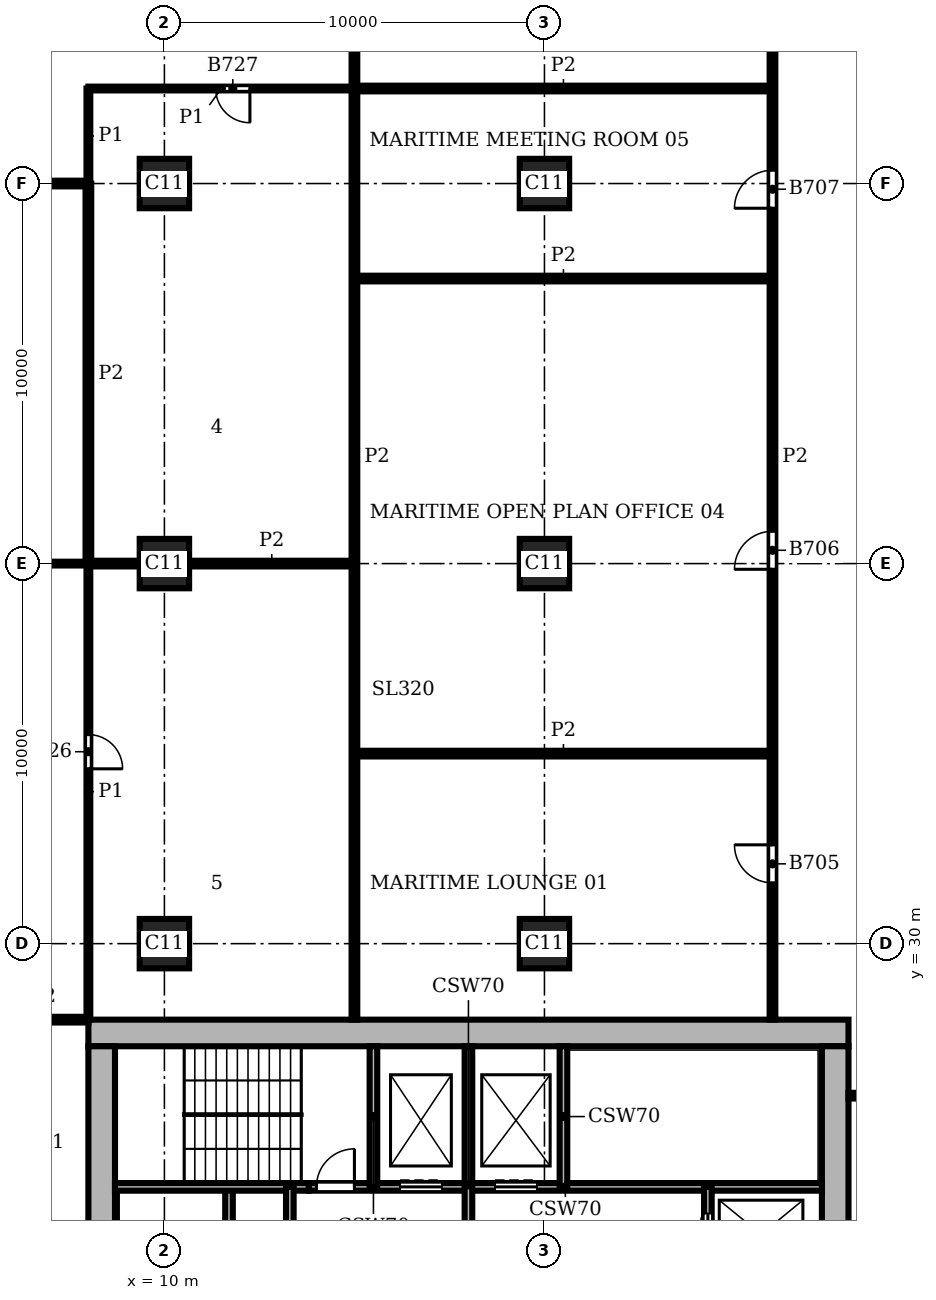
"""IFC4 building model, lengths in metres.
Left out: names, types, materials, properties, quantities, classifications, styles, units other than length and angle.
Written with IfcOpenShell. Run it as: python <this file> out.ifc"""

import sys

from ifc_helpers import new_model, si_unit, direction, frame, frame_2d, origin, origin_2d, place, context, subcontext, project, spatial, rectangle, extrude, element, fill, save


model = new_model("IFC4")
c1 = context("Model", 3, precision=1e-05, world=origin(), true_north=direction((0.0, 1.0)))
c2 = subcontext(c1, "Body", "Model", "MODEL_VIEW")
j1 = project(units=[si_unit("LENGTHUNIT", "METRE"), si_unit("PLANEANGLEUNIT", "RADIAN")], contexts=[c1])
p1 = place(None, origin())
s1 = spatial("IfcSite", under=j1, at=p1, CompositionType="ELEMENT")
p2 = place(p1, origin())
s2 = spatial("IfcBuilding", under=s1, at=p2, CompositionType="ELEMENT")
p3 = place(p2, frame((0.0, 0.0, 205.8)))
s3 = spatial("IfcBuildingStorey", under=s2, at=p3, CompositionType="ELEMENT", Elevation=205.8)
for number, where, z_axis, x_axis in (
    (1, (10.0, 30.0, 0.0), (0.0, 0.0, 1.0), (1.0, 0.0, 0.0)),
    (2, (10.0, 40.0, 0.0), (0.0, 0.0, 1.0), (1.0, 0.0, 0.0)),
    (3, (10.0, 50.0, 0.0), (0.0, 0.0, 1.0), (1.0, 0.0, 0.0)),
    (4, (20.0, 30.0, 0.0), (0.0, 0.0, 1.0), (1.0, 0.0, 0.0)),
    (5, (20.0, 40.0, 0.0), (0.0, 0.0, 1.0), (1.0, 0.0, 0.0)),
    (6, (20.0, 50.0, 0.0), (0.0, 0.0, 1.0), (1.0, 0.0, 0.0)),
):
    element("IfcColumn", number, at=place(p3, frame(where, z_axis=z_axis, x_axis=x_axis)), inside=s3, PredefinedType="COLUMN", context=c2, shape_type="SweptSolid", body=[
        extrude(rectangle(XDim=1.3, YDim=1.3, at=origin_2d()), origin(), (0.0, 0.0, 1.0), 3.9),
    ])
p4 = place(p3, frame((27.65, 8.7, 0.0), z_axis=(0.0, 0.0, 1.0), x_axis=(0.0, 1.0, 0.0)))
e7 = element("IfcWall", 7, at=p4, inside=s3, PredefinedType="SHEAR", context=c2, shape_type="SweptSolid", body=[
    extrude(rectangle(XDim=18.6, YDim=0.7, at=frame_2d((9.3, 0.0))), origin(), (0.0, 0.0, 1.0), 3.9),
])
p5 = place(p4, frame((4.75, 0.0, 0.0)))
e8 = element("IfcOpeningElement", 8, at=p5, cuts=e7, PredefinedType="OPENING", context=c2, shape_type="SweptSolid", body=[
    extrude(rectangle(XDim=1.6, YDim=2.1, at=frame_2d((0.8, 1.05))), frame((0.0, 0.36, 0.0), z_axis=(0.0, -1.0, 0.0), x_axis=(1.0, 0.0, 0.0)), (0.0, 0.0, 1.0), 0.72),
])
p6 = place(p3, frame((28.0, 27.65, 0.0), z_axis=(0.0, 0.0, 1.0), x_axis=(-1.0, 0.0, 0.0)))
e9 = element("IfcWall", 9, at=p6, inside=s3, PredefinedType="SHEAR", context=c2, shape_type="SweptSolid", body=[
    extrude(rectangle(XDim=20.0, YDim=0.7, at=frame_2d((10.0, 0.0))), origin(), (0.0, 0.0, 1.0), 3.9),
])
p7 = place(p3, frame((8.35, 27.3, 0.0), z_axis=(0.0, 0.0, 1.0), x_axis=(0.0, -1.0, 0.0)))
e10 = element("IfcWall", 10, at=p7, inside=s3, PredefinedType="SHEAR", context=c2, shape_type="SweptSolid", body=[
    extrude(rectangle(XDim=18.6, YDim=0.7, at=frame_2d((9.3, 0.0))), origin(), (0.0, 0.0, 1.0), 3.9),
])
p8 = place(p3, frame((8.7, 23.6, 0.0), z_axis=(0.0, 0.0, 1.0), x_axis=(1.0, 0.0, 0.0)))
e11 = element("IfcWall", 11, at=p8, inside=s3, PredefinedType="SHEAR", context=c2, shape_type="SweptSolid", body=[
    extrude(rectangle(XDim=5.1, YDim=0.2, at=frame_2d((2.55, 0.0))), origin(), (0.0, 0.0, 1.0), 3.58),
])
p9 = place(p3, frame((13.8, 23.6, 0.0), z_axis=(0.0, 0.0, 1.0), x_axis=(1.0, 0.0, 0.0)))
e12 = element("IfcWall", 12, at=p9, inside=s3, PredefinedType="SHEAR", context=c2, shape_type="SweptSolid", body=[
    extrude(rectangle(XDim=13.5, YDim=0.2, at=frame_2d((6.75, 0.0))), origin(), (0.0, 0.0, 1.0), 3.58),
])
p10 = place(p9, frame((2.4, 0.0, 0.0)))
e13 = element("IfcOpeningElement", 13, at=p10, cuts=e12, PredefinedType="OPENING", context=c2, shape_type="SweptSolid", body=[
    extrude(rectangle(XDim=1.1, YDim=2.1, at=frame_2d((0.55, 1.05))), frame((0.0, 0.11, 0.0), z_axis=(0.0, -1.0, 0.0), x_axis=(1.0, 0.0, 0.0)), (0.0, 0.0, 1.0), 0.22),
])
p11 = place(p9, frame((4.9, 0.0, 0.0)))
e14 = element("IfcOpeningElement", 14, at=p11, cuts=e12, PredefinedType="OPENING", context=c2, shape_type="SweptSolid", body=[
    extrude(rectangle(XDim=1.1, YDim=2.1, at=frame_2d((0.55, 1.05))), frame((0.0, 0.11, 0.0), z_axis=(0.0, -1.0, 0.0), x_axis=(1.0, 0.0, 0.0)), (0.0, 0.0, 1.0), 0.22),
])
p12 = place(p9, frame((0.2, 0.0, 0.0)))
e15 = element("IfcOpeningElement", 15, at=p12, cuts=e12, PredefinedType="OPENING", context=c2, shape_type="SweptSolid", body=[
    extrude(rectangle(XDim=1.0, YDim=2.1, at=frame_2d((0.5, 1.05))), frame((0.0, 0.11, 0.0), z_axis=(0.0, -1.0, 0.0), x_axis=(1.0, 0.0, 0.0)), (0.0, 0.0, 1.0), 0.22),
])
p13 = place(p3, frame((11.7, 12.4, 0.0), z_axis=(0.0, 0.0, 1.0), x_axis=(0.0, 1.0, 0.0)))
e16 = element("IfcWall", 16, at=p13, inside=s3, PredefinedType="SHEAR", context=c2, shape_type="SweptSolid", body=[
    extrude(rectangle(XDim=11.2, YDim=0.2, at=frame_2d((5.6, 0.0))), origin(), (0.0, 0.0, 1.0), 3.58),
])
p14 = place(p13, frame((0.7, 0.0, 0.0)))
e17 = element("IfcOpeningElement", 17, at=p14, cuts=e16, PredefinedType="OPENING", context=c2, shape_type="SweptSolid", body=[
    extrude(rectangle(XDim=1.1, YDim=2.1, at=frame_2d((0.55, 1.05))), frame((0.0, 0.11, 0.0), z_axis=(0.0, -1.0, 0.0), x_axis=(1.0, 0.0, 0.0)), (0.0, 0.0, 1.0), 0.22),
])
p15 = place(p13, frame((3.2, 0.0, 0.0)))
e18 = element("IfcOpeningElement", 18, at=p15, cuts=e16, PredefinedType="OPENING", context=c2, shape_type="SweptSolid", body=[
    extrude(rectangle(XDim=1.1, YDim=2.1, at=frame_2d((0.55, 1.05))), frame((0.0, 0.11, 0.0), z_axis=(0.0, -1.0, 0.0), x_axis=(1.0, 0.0, 0.0)), (0.0, 0.0, 1.0), 0.22),
])
p16 = place(p13, frame((5.7, 0.0, 0.0)))
e19 = element("IfcOpeningElement", 19, at=p16, cuts=e16, PredefinedType="OPENING", context=c2, shape_type="SweptSolid", body=[
    extrude(rectangle(XDim=1.1, YDim=2.1, at=frame_2d((0.55, 1.05))), frame((0.0, 0.11, 0.0), z_axis=(0.0, -1.0, 0.0), x_axis=(1.0, 0.0, 0.0)), (0.0, 0.0, 1.0), 0.22),
])
p17 = place(p13, frame((8.2, 0.0, 0.0)))
e20 = element("IfcOpeningElement", 20, at=p17, cuts=e16, PredefinedType="OPENING", context=c2, shape_type="SweptSolid", body=[
    extrude(rectangle(XDim=1.1, YDim=2.1, at=frame_2d((0.55, 1.05))), frame((0.0, 0.11, 0.0), z_axis=(0.0, -1.0, 0.0), x_axis=(1.0, 0.0, 0.0)), (0.0, 0.0, 1.0), 0.22),
])
p18 = place(p3, frame((13.3, 20.0, 0.0), z_axis=(0.0, 0.0, 1.0), x_axis=(0.0, 1.0, 0.0)))
e21 = element("IfcWall", 21, at=p18, inside=s3, PredefinedType="SHEAR", context=c2, shape_type="SweptSolid", body=[
    extrude(rectangle(XDim=3.6, YDim=0.2, at=frame_2d((1.8, 0.0))), origin(), (0.0, 0.0, 1.0), 3.58),
])
p19 = place(p3, frame((15.5, 23.6, 0.0), z_axis=(0.0, 0.0, 1.0), x_axis=(0.0, 1.0, 0.0)))
e22 = element("IfcWall", 22, at=p19, inside=s3, PredefinedType="SHEAR", context=c2, shape_type="SweptSolid", body=[
    extrude(rectangle(XDim=3.7, YDim=0.2, at=frame_2d((1.85, 0.0))), origin(), (0.0, 0.0, 1.0), 3.58),
])
p20 = place(p3, frame((18.0, 20.0, 0.0), z_axis=(0.0, 0.0, 1.0), x_axis=(0.0, 1.0, 0.0)))
e23 = element("IfcWall", 23, at=p20, inside=s3, PredefinedType="SHEAR", context=c2, shape_type="SweptSolid", body=[
    extrude(rectangle(XDim=7.3, YDim=0.2, at=frame_2d((3.65, 0.0))), origin(), (0.0, 0.0, 1.0), 3.58),
])
p21 = place(p20, frame((1.2, 0.0, 0.0)))
e24 = element("IfcOpeningElement", 24, at=p21, cuts=e23, PredefinedType="OPENING", context=c2, shape_type="SweptSolid", body=[
    extrude(rectangle(XDim=1.2, YDim=2.1, at=frame_2d((0.6, 1.05))), frame((0.0, 0.11, 0.0), z_axis=(0.0, -1.0, 0.0), x_axis=(1.0, 0.0, 0.0)), (0.0, 0.0, 1.0), 0.22),
])
p22 = place(p3, frame((20.5, 23.6, 0.0), z_axis=(0.0, 0.0, 1.0), x_axis=(0.0, 1.0, 0.0)))
e25 = element("IfcWall", 25, at=p22, inside=s3, PredefinedType="SHEAR", context=c2, shape_type="SweptSolid", body=[
    extrude(rectangle(XDim=3.7, YDim=0.2, at=frame_2d((1.85, 0.0))), origin(), (0.0, 0.0, 1.0), 3.58),
])
p23 = place(p3, frame((24.3, 16.1, 0.0), z_axis=(0.0, 0.0, 1.0), x_axis=(0.0, 1.0, 0.0)))
e26 = element("IfcWall", 26, at=p23, inside=s3, PredefinedType="SHEAR", context=c2, shape_type="SweptSolid", body=[
    extrude(rectangle(XDim=7.5, YDim=0.2, at=frame_2d((3.75, 0.0))), origin(), (0.0, 0.0, 1.0), 3.58),
])
p24 = place(p23, frame((5.7, 0.0, 0.0)))
e27 = element("IfcOpeningElement", 27, at=p24, cuts=e26, PredefinedType="OPENING", context=c2, shape_type="SweptSolid", body=[
    extrude(rectangle(XDim=1.1, YDim=2.1, at=frame_2d((0.55, 1.05))), frame((0.0, 0.11, 0.0), z_axis=(0.0, -1.0, 0.0), x_axis=(1.0, 0.0, 0.0)), (0.0, 0.0, 1.0), 0.22),
])
p25 = place(p3, frame((8.0, 28.0, 0.0), z_axis=(0.0, 0.0, 1.0), x_axis=(0.0, 1.0, 0.0)))
e28 = element("IfcWall", 28, at=p25, inside=s3, PredefinedType="PARTITIONING", context=c2, shape_type="SweptSolid", body=[
    extrude(rectangle(XDim=12.0, YDim=0.1, at=frame_2d((6.0, 0.0))), origin(), (0.0, 0.0, 1.0), 3.58),
])
p26 = place(p25, frame((6.6, 0.0, 0.0)))
e29 = element("IfcOpeningElement", 29, at=p26, cuts=e28, PredefinedType="OPENING", context=c2, shape_type="SweptSolid", body=[
    extrude(rectangle(XDim=0.9, YDim=2.1, at=frame_2d((0.45, 1.05))), frame((0.0, 0.06, 0.0), z_axis=(0.0, -1.0, 0.0), x_axis=(1.0, 0.0, 0.0)), (0.0, 0.0, 1.0), 0.12),
])
p27 = place(p3, frame((8.0, 50.0, 0.0), z_axis=(0.0, 0.0, 1.0), x_axis=(0.0, 1.0, 0.0)))
e30 = element("IfcWall", 30, at=p27, inside=s3, PredefinedType="PARTITIONING", context=c2, shape_type="SweptSolid", body=[
    extrude(rectangle(XDim=2.5, YDim=0.1, at=frame_2d((1.25, 0.0))), origin(), (0.0, 0.0, 1.0), 3.58),
])
p28 = place(p3, frame((0.45, 40.0, 0.0), z_axis=(0.0, 0.0, 1.0), x_axis=(1.0, 0.0, 0.0)))
e31 = element("IfcWall", 31, at=p28, inside=s3, PredefinedType="PARTITIONING", context=c2, shape_type="SweptSolid", body=[
    extrude(rectangle(XDim=7.55, YDim=0.1, at=frame_2d((3.775, 0.0))), origin(), (0.0, 0.0, 1.0), 3.58),
])
p29 = place(p28, frame((2.975, 0.0, 0.0)))
e32 = element("IfcOpeningElement", 32, at=p29, cuts=e31, PredefinedType="OPENING", context=c2, shape_type="SweptSolid", body=[
    extrude(rectangle(XDim=0.95, YDim=2.1, at=frame_2d((0.475, 1.05))), frame((0.0, 0.06, 0.0), z_axis=(0.0, -1.0, 0.0), x_axis=(1.0, 0.0, 0.0)), (0.0, 0.0, 1.0), 0.12),
])
p30 = place(p3, frame((8.0, 52.5, 0.0), z_axis=(0.0, 0.0, 1.0), x_axis=(1.0, 0.0, 0.0)))
e33 = element("IfcWall", 33, at=p30, inside=s3, PredefinedType="PARTITIONING", context=c2, shape_type="SweptSolid", body=[
    extrude(rectangle(XDim=7.0, YDim=0.1, at=frame_2d((3.5, 0.0))), origin(), (0.0, 0.0, 1.0), 3.58),
])
p31 = place(p30, frame((3.35, 0.0, 0.0)))
e34 = element("IfcOpeningElement", 34, at=p31, cuts=e33, PredefinedType="OPENING", context=c2, shape_type="SweptSolid", body=[
    extrude(rectangle(XDim=0.9, YDim=2.1, at=frame_2d((0.45, 1.05))), frame((0.0, 0.06, 0.0), z_axis=(0.0, -1.0, 0.0), x_axis=(1.0, 0.0, 0.0)), (0.0, 0.0, 1.0), 0.12),
])
p32 = place(p3, frame((8.0, 40.0, 0.0), z_axis=(0.0, 0.0, 1.0), x_axis=(0.0, 1.0, 0.0)))
e35 = element("IfcWall", 35, at=p32, inside=s3, PredefinedType="PARTITIONING", context=c2, shape_type="SweptSolid", body=[
    extrude(rectangle(XDim=10.0, YDim=0.15, at=frame_2d((5.0, 0.0))), origin(), (0.0, 0.0, 1.0), 3.58),
])
p33 = place(p3, frame((15.0, 28.0, 0.0), z_axis=(0.0, 0.0, 1.0), x_axis=(0.0, 1.0, 0.0)))
e36 = element("IfcWall", 36, at=p33, inside=s3, PredefinedType="PARTITIONING", context=c2, shape_type="SweptSolid", body=[
    extrude(rectangle(XDim=29.6, YDim=0.15, at=frame_2d((14.8, 0.0))), origin(), (0.0, 0.0, 1.0), 3.58),
])
p34 = place(p3, frame((26.0, 28.0, 0.0), z_axis=(0.0, 0.0, 1.0), x_axis=(0.0, 1.0, 0.0)))
e37 = element("IfcWall", 37, at=p34, inside=s3, PredefinedType="PARTITIONING", context=c2, shape_type="SweptSolid", body=[
    extrude(rectangle(XDim=29.6, YDim=0.15, at=frame_2d((14.8, 0.0))), origin(), (0.0, 0.0, 1.0), 3.58),
])
p35 = place(p34, frame((3.6, 0.0, 0.0)))
e38 = element("IfcOpeningElement", 38, at=p35, cuts=e37, PredefinedType="OPENING", context=c2, shape_type="SweptSolid", body=[
    extrude(rectangle(XDim=1.0, YDim=2.1, at=frame_2d((0.5, 1.05))), frame((0.0, 0.085, 0.0), z_axis=(0.0, -1.0, 0.0), x_axis=(1.0, 0.0, 0.0)), (0.0, 0.0, 1.0), 0.17),
])
p36 = place(p34, frame((11.85, 0.0, 0.0)))
e39 = element("IfcOpeningElement", 39, at=p36, cuts=e37, PredefinedType="OPENING", context=c2, shape_type="SweptSolid", body=[
    extrude(rectangle(XDim=1.0, YDim=2.1, at=frame_2d((0.5, 1.05))), frame((0.0, 0.085, 0.0), z_axis=(0.0, -1.0, 0.0), x_axis=(1.0, 0.0, 0.0)), (0.0, 0.0, 1.0), 0.17),
])
p37 = place(p34, frame((21.35, 0.0, 0.0)))
e40 = element("IfcOpeningElement", 40, at=p37, cuts=e37, PredefinedType="OPENING", context=c2, shape_type="SweptSolid", body=[
    extrude(rectangle(XDim=1.0, YDim=2.1, at=frame_2d((0.5, 1.05))), frame((0.0, 0.085, 0.0), z_axis=(0.0, -1.0, 0.0), x_axis=(1.0, 0.0, 0.0)), (0.0, 0.0, 1.0), 0.17),
])
p38 = place(p3, frame((28.0, 26.0, 0.0), z_axis=(0.0, 0.0, 1.0), x_axis=(1.0, 0.0, 0.0)))
e41 = element("IfcWall", 41, at=p38, inside=s3, PredefinedType="PARTITIONING", context=c2, shape_type="SweptSolid", body=[
    extrude(rectangle(XDim=2.8, YDim=0.15, at=frame_2d((1.4, 0.0))), origin(), (0.0, 0.0, 1.0), 3.58),
])
p39 = place(p3, frame((5.6, 28.0, 0.0), z_axis=(0.0, 0.0, 1.0), x_axis=(1.0, 0.0, 0.0)))
e42 = element("IfcWall", 42, at=p39, inside=s3, PredefinedType="PARTITIONING", context=c2, shape_type="SweptSolid", body=[
    extrude(rectangle(XDim=2.4, YDim=0.15, at=frame_2d((1.2, 0.0))), origin(), (0.0, 0.0, 1.0), 3.58),
])
p40 = place(p3, frame((15.0, 35.0, 0.0), z_axis=(0.0, 0.0, 1.0), x_axis=(1.0, 0.0, 0.0)))
e43 = element("IfcWall", 43, at=p40, inside=s3, PredefinedType="PARTITIONING", context=c2, shape_type="SweptSolid", body=[
    extrude(rectangle(XDim=11.0, YDim=0.15, at=frame_2d((5.5, 0.0))), origin(), (0.0, 0.0, 1.0), 3.58),
])
p41 = place(p3, frame((8.0, 40.0, 0.0), z_axis=(0.0, 0.0, 1.0), x_axis=(1.0, 0.0, 0.0)))
e44 = element("IfcWall", 44, at=p41, inside=s3, PredefinedType="PARTITIONING", context=c2, shape_type="SweptSolid", body=[
    extrude(rectangle(XDim=1.35, YDim=0.15, at=frame_2d((0.675, 0.0))), origin(), (0.0, 0.0, 1.0), 3.58),
])
p42 = place(p3, frame((10.65, 40.0, 0.0), z_axis=(0.0, 0.0, 1.0), x_axis=(1.0, 0.0, 0.0)))
e45 = element("IfcWall", 45, at=p42, inside=s3, PredefinedType="PARTITIONING", context=c2, shape_type="SweptSolid", body=[
    extrude(rectangle(XDim=4.35, YDim=0.15, at=frame_2d((2.175, 0.0))), origin(), (0.0, 0.0, 1.0), 3.58),
])
p43 = place(p3, frame((15.0, 47.5, 0.0), z_axis=(0.0, 0.0, 1.0), x_axis=(1.0, 0.0, 0.0)))
e46 = element("IfcWall", 46, at=p43, inside=s3, PredefinedType="PARTITIONING", context=c2, shape_type="SweptSolid", body=[
    extrude(rectangle(XDim=11.0, YDim=0.15, at=frame_2d((5.5, 0.0))), origin(), (0.0, 0.0, 1.0), 3.58),
])
p44 = place(p3, frame((0.45, 50.0, 0.0), z_axis=(0.0, 0.0, 1.0), x_axis=(1.0, 0.0, 0.0)))
e47 = element("IfcWall", 47, at=p44, inside=s3, PredefinedType="PARTITIONING", context=c2, shape_type="SweptSolid", body=[
    extrude(rectangle(XDim=7.55, YDim=0.15, at=frame_2d((3.775, 0.0))), origin(), (0.0, 0.0, 1.0), 3.58),
])
p45 = place(p3, frame((15.0, 52.5, 0.0), z_axis=(0.0, 0.0, 1.0), x_axis=(1.0, 0.0, 0.0)))
e48 = element("IfcWall", 48, at=p45, inside=s3, PredefinedType="PARTITIONING", context=c2, shape_type="SweptSolid", body=[
    extrude(rectangle(XDim=11.0, YDim=0.15, at=frame_2d((5.5, 0.0))), origin(), (0.0, 0.0, 1.0), 3.58),
])
p46 = place(p24, origin())
e49 = element("IfcDoor", 49, at=p46, inside=s3, OperationType="DOUBLE_DOOR_SLIDING", PredefinedType="DOOR", context=c2, shape_type="SweptSolid", body=[
    extrude(rectangle(XDim=1.1, YDim=2.1, at=frame_2d((0.55, 1.05))), frame((0.0, 0.025, 0.0), z_axis=(0.0, -1.0, 0.0), x_axis=(1.0, 0.0, 0.0)), (0.0, 0.0, 1.0), 0.05),
])
fill(e27, e49)
p47 = place(p10, origin())
e50 = element("IfcDoor", 50, at=p47, inside=s3, OperationType="DOUBLE_DOOR_SLIDING", PredefinedType="DOOR", context=c2, shape_type="SweptSolid", body=[
    extrude(rectangle(XDim=1.1, YDim=2.1, at=frame_2d((0.55, 1.05))), frame((0.0, 0.025, 0.0), z_axis=(0.0, -1.0, 0.0), x_axis=(1.0, 0.0, 0.0)), (0.0, 0.0, 1.0), 0.05),
])
fill(e13, e50)
p48 = place(p11, origin())
e51 = element("IfcDoor", 51, at=p48, inside=s3, OperationType="DOUBLE_DOOR_SLIDING", PredefinedType="DOOR", context=c2, shape_type="SweptSolid", body=[
    extrude(rectangle(XDim=1.1, YDim=2.1, at=frame_2d((0.55, 1.05))), frame((0.0, 0.025, 0.0), z_axis=(0.0, -1.0, 0.0), x_axis=(1.0, 0.0, 0.0)), (0.0, 0.0, 1.0), 0.05),
])
fill(e14, e51)
p49 = place(p12, origin())
e52 = element("IfcDoor", 52, at=p49, inside=s3, OperationType="SINGLE_SWING_RIGHT", PredefinedType="DOOR", context=c2, shape_type="SweptSolid", body=[
    extrude(rectangle(XDim=1.0, YDim=2.1, at=frame_2d((0.5, 1.05))), frame((0.0, 0.025, 0.0), z_axis=(0.0, -1.0, 0.0), x_axis=(1.0, 0.0, 0.0)), (0.0, 0.0, 1.0), 0.05),
])
fill(e15, e52)
p50 = place(p35, origin())
e53 = element("IfcDoor", 53, at=p50, inside=s3, OperationType="SINGLE_SWING_RIGHT", PredefinedType="DOOR", context=c2, shape_type="SweptSolid", body=[
    extrude(rectangle(XDim=1.0, YDim=2.1, at=frame_2d((0.5, 1.05))), frame((0.0, 0.025, 0.0), z_axis=(0.0, -1.0, 0.0), x_axis=(1.0, 0.0, 0.0)), (0.0, 0.0, 1.0), 0.05),
])
fill(e38, e53)
p51 = place(p36, origin())
e54 = element("IfcDoor", 54, at=p51, inside=s3, OperationType="SINGLE_SWING_LEFT", PredefinedType="DOOR", context=c2, shape_type="SweptSolid", body=[
    extrude(rectangle(XDim=1.0, YDim=2.1, at=frame_2d((0.5, 1.05))), frame((0.0, 0.025, 0.0), z_axis=(0.0, -1.0, 0.0), x_axis=(1.0, 0.0, 0.0)), (0.0, 0.0, 1.0), 0.05),
])
fill(e39, e54)
p52 = place(p37, origin())
e55 = element("IfcDoor", 55, at=p52, inside=s3, OperationType="SINGLE_SWING_LEFT", PredefinedType="DOOR", context=c2, shape_type="SweptSolid", body=[
    extrude(rectangle(XDim=1.0, YDim=2.1, at=frame_2d((0.5, 1.05))), frame((0.0, 0.025, 0.0), z_axis=(0.0, -1.0, 0.0), x_axis=(1.0, 0.0, 0.0)), (0.0, 0.0, 1.0), 0.05),
])
fill(e40, e55)
p53 = place(p26, frame((0.9, 0.0, 0.0), z_axis=(0.0, 0.0, 1.0), x_axis=(-1.0, 0.0, 0.0)))
e56 = element("IfcDoor", 56, at=p53, inside=s3, OperationType="SINGLE_SWING_RIGHT", PredefinedType="DOOR", context=c2, shape_type="SweptSolid", body=[
    extrude(rectangle(XDim=0.9, YDim=2.1, at=frame_2d((0.45, 1.05))), frame((0.0, 0.025, 0.0), z_axis=(0.0, -1.0, 0.0), x_axis=(1.0, 0.0, 0.0)), (0.0, 0.0, 1.0), 0.05),
])
fill(e29, e56)
p54 = place(p31, frame((0.9, 0.0, 0.0), z_axis=(0.0, 0.0, 1.0), x_axis=(-1.0, 0.0, 0.0)))
e57 = element("IfcDoor", 57, at=p54, inside=s3, OperationType="SINGLE_SWING_LEFT", PredefinedType="DOOR", context=c2, shape_type="SweptSolid", body=[
    extrude(rectangle(XDim=0.9, YDim=2.1, at=frame_2d((0.45, 1.05))), frame((0.0, 0.025, 0.0), z_axis=(0.0, -1.0, 0.0), x_axis=(1.0, 0.0, 0.0)), (0.0, 0.0, 1.0), 0.05),
])
fill(e34, e57)
save(model, sys.argv[1])
